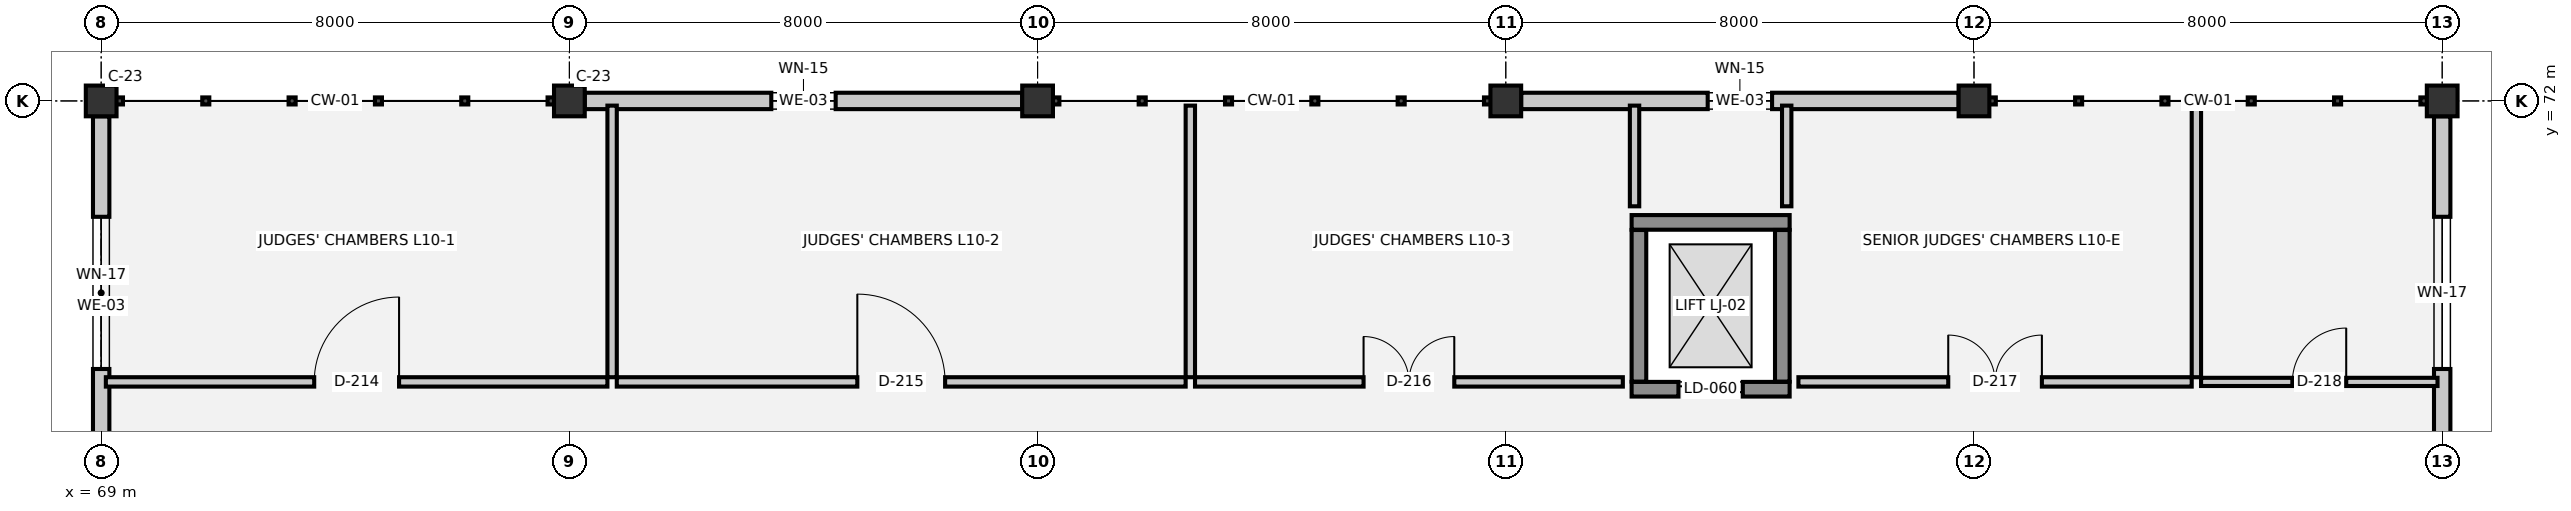
"""IFC4 building model, lengths in metres.
Left out: names, types, materials, properties, quantities, classifications, styles, units other than length and angle.
Written with IfcOpenShell. Run it as: python <this file> out.ifc"""

import sys

from ifc_helpers import new_model, si_unit, direction, frame, frame_2d, origin, origin_2d, place, context, subcontext, project, spatial, rectangle, extrude, element, fill, save


model = new_model("IFC4")
c1 = context("Model", 3, precision=1e-05, world=origin(), true_north=direction((0.0, 1.0)))
c2 = subcontext(c1, "Body", "Model", "MODEL_VIEW")
j1 = project(units=[si_unit("LENGTHUNIT", "METRE"), si_unit("PLANEANGLEUNIT", "RADIAN")], contexts=[c1])
p1 = place(None, origin())
s1 = spatial("IfcSite", under=j1, at=p1, CompositionType="ELEMENT")
p2 = place(p1, origin())
s2 = spatial("IfcBuilding", under=s1, at=p2, CompositionType="ELEMENT")
p3 = place(p2, frame((0.0, 0.0, 37.05)))
s3 = spatial("IfcBuildingStorey", under=s2, at=p3, CompositionType="ELEMENT", Elevation=37.05)
for number, where, z_axis, x_axis in (
    (1, (69.0, 72.0, 0.0), (0.0, 0.0, 1.0), (1.0, 0.0, 0.0)),
    (2, (77.0, 72.0, 0.0), (0.0, 0.0, 1.0), (1.0, 0.0, 0.0)),
    (3, (85.0, 72.0, 0.0), (0.0, 0.0, 1.0), (1.0, 0.0, 0.0)),
    (4, (93.0, 72.0, 0.0), (0.0, 0.0, 1.0), (1.0, 0.0, 0.0)),
    (5, (101.0, 72.0, 0.0), (0.0, 0.0, 1.0), (1.0, 0.0, 0.0)),
    (6, (109.0, 72.0, 0.0), (0.0, 0.0, 1.0), (1.0, 0.0, 0.0)),
):
    element("IfcColumn", number, at=place(p3, frame(where, z_axis=z_axis, x_axis=x_axis)), inside=s3, PredefinedType="COLUMN", context=c2, shape_type="SweptSolid", body=[
        extrude(rectangle(XDim=0.525, YDim=0.525, at=origin_2d()), origin(), (0.0, 0.0, 1.0), 3.75),
    ])
p4 = place(p3, frame((69.0, 65.262, 0.0), z_axis=(0.0, 0.0, 1.0), x_axis=(0.0, 1.0, 0.0)))
e7 = element("IfcWall", 7, at=p4, inside=s3, PredefinedType="SOLIDWALL", context=c2, shape_type="SweptSolid", body=[
    extrude(rectangle(XDim=6.475, YDim=0.28, at=frame_2d((3.238, 0.0))), origin(), (0.0, 0.0, 1.0), 2.6),
])
p5 = place(p4, frame((2.158, 0.0, 1.0)))
e8 = element("IfcOpeningElement", 8, at=p5, cuts=e7, PredefinedType="OPENING", context=c2, shape_type="SweptSolid", body=[
    extrude(rectangle(XDim=2.6, YDim=1.1, at=frame_2d((1.3, 0.55))), frame((0.0, 0.15, 0.0), z_axis=(0.0, -1.0, 0.0), x_axis=(1.0, 0.0, 0.0)), (0.0, 0.0, 1.0), 0.3),
])
p6 = place(p3, frame((77.262, 72.0, 0.0), z_axis=(0.0, 0.0, 1.0), x_axis=(1.0, 0.0, 0.0)))
e9 = element("IfcWall", 9, at=p6, inside=s3, PredefinedType="SOLIDWALL", context=c2, shape_type="SweptSolid", body=[
    extrude(rectangle(XDim=7.475, YDim=0.28, at=frame_2d((3.738, 0.0))), origin(), (0.0, 0.0, 1.0), 2.6),
])
p7 = place(p6, frame((3.188, 0.0, 0.9)))
e10 = element("IfcOpeningElement", 10, at=p7, cuts=e9, PredefinedType="OPENING", context=c2, shape_type="SweptSolid", body=[
    extrude(rectangle(XDim=1.1, YDim=1.2, at=frame_2d((0.55, 0.6))), frame((0.0, 0.15, 0.0), z_axis=(0.0, -1.0, 0.0), x_axis=(1.0, 0.0, 0.0)), (0.0, 0.0, 1.0), 0.3),
])
p8 = place(p3, frame((93.262, 72.0, 0.0), z_axis=(0.0, 0.0, 1.0), x_axis=(1.0, 0.0, 0.0)))
e11 = element("IfcWall", 11, at=p8, inside=s3, PredefinedType="SOLIDWALL", context=c2, shape_type="SweptSolid", body=[
    extrude(rectangle(XDim=7.475, YDim=0.28, at=frame_2d((3.738, 0.0))), origin(), (0.0, 0.0, 1.0), 2.6),
])
p9 = place(p8, frame((3.188, 0.0, 0.9)))
e12 = element("IfcOpeningElement", 12, at=p9, cuts=e11, PredefinedType="OPENING", context=c2, shape_type="SweptSolid", body=[
    extrude(rectangle(XDim=1.1, YDim=1.2, at=frame_2d((0.55, 0.6))), frame((0.0, 0.15, 0.0), z_axis=(0.0, -1.0, 0.0), x_axis=(1.0, 0.0, 0.0)), (0.0, 0.0, 1.0), 0.3),
])
p10 = place(p3, frame((109.0, 71.738, 0.0), z_axis=(0.0, 0.0, 1.0), x_axis=(0.0, -1.0, 0.0)))
e13 = element("IfcWall", 13, at=p10, inside=s3, PredefinedType="SOLIDWALL", context=c2, shape_type="SweptSolid", body=[
    extrude(rectangle(XDim=6.475, YDim=0.28, at=frame_2d((3.238, 0.0))), origin(), (0.0, 0.0, 1.0), 2.6),
])
p11 = place(p10, frame((1.717, 0.0, 1.0)))
e14 = element("IfcOpeningElement", 14, at=p11, cuts=e13, PredefinedType="OPENING", context=c2, shape_type="SweptSolid", body=[
    extrude(rectangle(XDim=2.6, YDim=1.1, at=frame_2d((1.3, 0.55))), frame((0.0, 0.15, 0.0), z_axis=(0.0, -1.0, 0.0), x_axis=(1.0, 0.0, 0.0)), (0.0, 0.0, 1.0), 0.3),
])
p12 = place(p3, frame((95.15, 67.075, 0.0), z_axis=(0.0, 0.0, 1.0), x_axis=(1.0, 0.0, 0.0)))
e15 = element("IfcWall", 15, at=p12, inside=s3, PredefinedType="SHEAR", context=c2, shape_type="SweptSolid", body=[
    extrude(rectangle(XDim=2.7, YDim=0.25, at=frame_2d((1.35, 0.0))), origin(), (0.0, 0.0, 1.0), 3.47),
])
p13 = place(p12, frame((0.8, 0.0, 0.0)))
e16 = element("IfcOpeningElement", 16, at=p13, cuts=e15, PredefinedType="OPENING", context=c2, shape_type="SweptSolid", body=[
    extrude(rectangle(XDim=1.1, YDim=2.15, at=frame_2d((0.55, 1.075))), frame((0.0, 0.135, 0.0), z_axis=(0.0, -1.0, 0.0), x_axis=(1.0, 0.0, 0.0)), (0.0, 0.0, 1.0), 0.27),
])
p14 = place(p3, frame((97.85, 69.925, 0.0), z_axis=(0.0, 0.0, 1.0), x_axis=(-1.0, 0.0, 0.0)))
e17 = element("IfcWall", 17, at=p14, inside=s3, PredefinedType="SHEAR", context=c2, shape_type="SweptSolid", body=[
    extrude(rectangle(XDim=2.7, YDim=0.25, at=frame_2d((1.35, 0.0))), origin(), (0.0, 0.0, 1.0), 3.47),
])
for number, where, z_axis, x_axis in (
    (18, (95.275, 69.795, 0.0), (0.0, 0.0, 1.0), (0.0, -1.0, 0.0)),
    (19, (97.725, 67.205, 0.0), (0.0, 0.0, 1.0), (0.0, 1.0, 0.0)),
):
    element("IfcWall", number, at=place(p3, frame(where, z_axis=z_axis, x_axis=x_axis)), inside=s3, PredefinedType="SHEAR", context=c2, shape_type="SweptSolid", body=[
        extrude(rectangle(XDim=2.59, YDim=0.25, at=frame_2d((1.295, 0.0))), origin(), (0.0, 0.0, 1.0), 3.47),
    ])
p15 = place(p3, frame((69.08, 67.2, 0.0), z_axis=(0.0, 0.0, 1.0), x_axis=(1.0, 0.0, 0.0)))
e20 = element("IfcWall", 20, at=p15, inside=s3, PredefinedType="PARTITIONING", context=c2, shape_type="SweptSolid", body=[
    extrude(rectangle(XDim=8.57, YDim=0.16, at=frame_2d((4.285, 0.0))), origin(), (0.0, 0.0, 1.0), 3.39),
])
p16 = place(p15, frame((3.56, 0.0, 0.0)))
e21 = element("IfcOpeningElement", 21, at=p16, cuts=e20, PredefinedType="OPENING", context=c2, shape_type="SweptSolid", body=[
    extrude(rectangle(XDim=1.45, YDim=2.25, at=frame_2d((0.725, 1.125))), frame((0.0, 0.09, 0.0), z_axis=(0.0, -1.0, 0.0), x_axis=(1.0, 0.0, 0.0)), (0.0, 0.0, 1.0), 0.18),
])
p17 = place(p3, frame((77.81, 67.2, 0.0), z_axis=(0.0, 0.0, 1.0), x_axis=(1.0, 0.0, 0.0)))
e22 = element("IfcWall", 22, at=p17, inside=s3, PredefinedType="PARTITIONING", context=c2, shape_type="SweptSolid", body=[
    extrude(rectangle(XDim=9.72, YDim=0.16, at=frame_2d((4.86, 0.0))), origin(), (0.0, 0.0, 1.0), 3.39),
])
p18 = place(p17, frame((4.11, 0.0, 0.0)))
e23 = element("IfcOpeningElement", 23, at=p18, cuts=e22, PredefinedType="OPENING", context=c2, shape_type="SweptSolid", body=[
    extrude(rectangle(XDim=1.5, YDim=2.25, at=frame_2d((0.75, 1.125))), frame((0.0, 0.09, 0.0), z_axis=(0.0, -1.0, 0.0), x_axis=(1.0, 0.0, 0.0)), (0.0, 0.0, 1.0), 0.18),
])
p19 = place(p3, frame((87.69, 67.2, 0.0), z_axis=(0.0, 0.0, 1.0), x_axis=(1.0, 0.0, 0.0)))
e24 = element("IfcWall", 24, at=p19, inside=s3, PredefinedType="PARTITIONING", context=c2, shape_type="SweptSolid", body=[
    extrude(rectangle(XDim=7.31, YDim=0.16, at=frame_2d((3.655, 0.0))), origin(), (0.0, 0.0, 1.0), 3.39),
])
p20 = place(p19, frame((2.88, 0.0, 0.0)))
e25 = element("IfcOpeningElement", 25, at=p20, cuts=e24, PredefinedType="OPENING", context=c2, shape_type="SweptSolid", body=[
    extrude(rectangle(XDim=1.55, YDim=2.25, at=frame_2d((0.775, 1.125))), frame((0.0, 0.09, 0.0), z_axis=(0.0, -1.0, 0.0), x_axis=(1.0, 0.0, 0.0)), (0.0, 0.0, 1.0), 0.18),
])
p21 = place(p3, frame((98.0, 67.2, 0.0), z_axis=(0.0, 0.0, 1.0), x_axis=(1.0, 0.0, 0.0)))
e26 = element("IfcWall", 26, at=p21, inside=s3, PredefinedType="PARTITIONING", context=c2, shape_type="SweptSolid", body=[
    extrude(rectangle(XDim=6.72, YDim=0.16, at=frame_2d((3.36, 0.0))), origin(), (0.0, 0.0, 1.0), 3.39),
])
p22 = place(p21, frame((2.56, 0.0, 0.0)))
e27 = element("IfcOpeningElement", 27, at=p22, cuts=e26, PredefinedType="OPENING", context=c2, shape_type="SweptSolid", body=[
    extrude(rectangle(XDim=1.6, YDim=2.25, at=frame_2d((0.8, 1.125))), frame((0.0, 0.09, 0.0), z_axis=(0.0, -1.0, 0.0), x_axis=(1.0, 0.0, 0.0)), (0.0, 0.0, 1.0), 0.18),
])
p23 = place(p3, frame((104.88, 67.2, 0.0), z_axis=(0.0, 0.0, 1.0), x_axis=(1.0, 0.0, 0.0)))
e28 = element("IfcWall", 28, at=p23, inside=s3, PredefinedType="PLUMBINGWALL", context=c2, shape_type="SweptSolid", body=[
    extrude(rectangle(XDim=4.04, YDim=0.14, at=frame_2d((2.02, 0.0))), origin(), (0.0, 0.0, 1.0), 3.39),
])
p24 = place(p23, frame((1.56, 0.0, 0.0)))
e29 = element("IfcOpeningElement", 29, at=p24, cuts=e28, PredefinedType="OPENING", context=c2, shape_type="SweptSolid", body=[
    extrude(rectangle(XDim=0.92, YDim=2.1, at=frame_2d((0.46, 1.05))), frame((0.0, 0.08, 0.0), z_axis=(0.0, -1.0, 0.0), x_axis=(1.0, 0.0, 0.0)), (0.0, 0.0, 1.0), 0.16),
])
for number, where, z_axis, x_axis in (
    (30, (77.73, 67.28, 0.0), (0.0, 0.0, 1.0), (0.0, 1.0, 0.0)),
    (31, (87.61, 67.28, 0.0), (0.0, 0.0, 1.0), (0.0, 1.0, 0.0)),
):
    element("IfcWall", number, at=place(p3, frame(where, z_axis=z_axis, x_axis=x_axis)), inside=s3, PredefinedType="PARTITIONING", context=c2, shape_type="SweptSolid", body=[
        extrude(rectangle(XDim=4.64, YDim=0.16, at=frame_2d((2.32, 0.0))), origin(), (0.0, 0.0, 1.0), 3.39),
    ])
for number, where, z_axis, x_axis in (
    (32, (95.2, 70.2, 0.0), (0.0, 0.0, 1.0), (0.0, 1.0, 0.0)),
    (33, (97.8, 70.2, 0.0), (0.0, 0.0, 1.0), (0.0, 1.0, 0.0)),
):
    element("IfcWall", number, at=place(p3, frame(where, z_axis=z_axis, x_axis=x_axis)), inside=s3, PredefinedType="PARTITIONING", context=c2, shape_type="SweptSolid", body=[
        extrude(rectangle(XDim=1.72, YDim=0.16, at=frame_2d((0.86, 0.0))), origin(), (0.0, 0.0, 1.0), 3.39),
    ])
p25 = place(p3, frame((104.8, 67.28, 0.0), z_axis=(0.0, 0.0, 1.0), x_axis=(0.0, 1.0, 0.0)))
e34 = element("IfcWall", 34, at=p25, inside=s3, PredefinedType="PARTITIONING", context=c2, shape_type="SweptSolid", body=[
    extrude(rectangle(XDim=4.64, YDim=0.16, at=frame_2d((2.32, 0.0))), origin(), (0.0, 0.0, 1.0), 3.39),
])
p26 = place(p5, origin())
e35 = element("IfcWindow", 35, at=p26, inside=s3, PartitioningType="SINGLE_PANEL", PredefinedType="WINDOW", context=c2, shape_type="SweptSolid", body=[
    extrude(rectangle(XDim=2.6, YDim=1.1, at=frame_2d((1.3, 0.55))), frame((0.0, 0.03, 0.0), z_axis=(0.0, -1.0, 0.0), x_axis=(1.0, 0.0, 0.0)), (0.0, 0.0, 1.0), 0.06),
])
fill(e8, e35)
p27 = place(p7, origin())
e36 = element("IfcWindow", 36, at=p27, inside=s3, PartitioningType="SINGLE_PANEL", PredefinedType="WINDOW", context=c2, shape_type="SweptSolid", body=[
    extrude(rectangle(XDim=1.1, YDim=1.2, at=frame_2d((0.55, 0.6))), frame((0.0, 0.03, 0.0), z_axis=(0.0, -1.0, 0.0), x_axis=(1.0, 0.0, 0.0)), (0.0, 0.0, 1.0), 0.06),
])
fill(e10, e36)
p28 = place(p9, origin())
e37 = element("IfcWindow", 37, at=p28, inside=s3, PartitioningType="SINGLE_PANEL", PredefinedType="WINDOW", context=c2, shape_type="SweptSolid", body=[
    extrude(rectangle(XDim=1.1, YDim=1.2, at=frame_2d((0.55, 0.6))), frame((0.0, 0.03, 0.0), z_axis=(0.0, -1.0, 0.0), x_axis=(1.0, 0.0, 0.0)), (0.0, 0.0, 1.0), 0.06),
])
fill(e12, e37)
p29 = place(p11, origin())
e38 = element("IfcWindow", 38, at=p29, inside=s3, PartitioningType="SINGLE_PANEL", PredefinedType="WINDOW", context=c2, shape_type="SweptSolid", body=[
    extrude(rectangle(XDim=2.6, YDim=1.1, at=frame_2d((1.3, 0.55))), frame((0.0, 0.03, 0.0), z_axis=(0.0, -1.0, 0.0), x_axis=(1.0, 0.0, 0.0)), (0.0, 0.0, 1.0), 0.06),
])
fill(e14, e38)
p30 = place(p13, origin())
e39 = element("IfcDoor", 39, at=p30, inside=s3, OperationType="DOUBLE_DOOR_SLIDING", PredefinedType="DOOR", context=c2, shape_type="SweptSolid", body=[
    extrude(rectangle(XDim=1.1, YDim=2.15, at=frame_2d((0.55, 1.075))), frame((0.0, 0.025, 0.0), z_axis=(0.0, -1.0, 0.0), x_axis=(1.0, 0.0, 0.0)), (0.0, 0.0, 1.0), 0.05),
])
fill(e16, e39)
p31 = place(p16, origin())
e40 = element("IfcDoor", 40, at=p31, inside=s3, OperationType="SINGLE_SWING_RIGHT", PredefinedType="DOOR", context=c2, shape_type="SweptSolid", body=[
    extrude(rectangle(XDim=1.45, YDim=2.25, at=frame_2d((0.725, 1.125))), frame((0.0, 0.025, 0.0), z_axis=(0.0, -1.0, 0.0), x_axis=(1.0, 0.0, 0.0)), (0.0, 0.0, 1.0), 0.05),
])
fill(e21, e40)
p32 = place(p18, origin())
e41 = element("IfcDoor", 41, at=p32, inside=s3, OperationType="SINGLE_SWING_LEFT", PredefinedType="DOOR", context=c2, shape_type="SweptSolid", body=[
    extrude(rectangle(XDim=1.5, YDim=2.25, at=frame_2d((0.75, 1.125))), frame((0.0, 0.025, 0.0), z_axis=(0.0, -1.0, 0.0), x_axis=(1.0, 0.0, 0.0)), (0.0, 0.0, 1.0), 0.05),
])
fill(e23, e41)
p33 = place(p20, origin())
e42 = element("IfcDoor", 42, at=p33, inside=s3, OperationType="DOUBLE_DOOR_SINGLE_SWING", PredefinedType="DOOR", context=c2, shape_type="SweptSolid", body=[
    extrude(rectangle(XDim=1.55, YDim=2.25, at=frame_2d((0.775, 1.125))), frame((0.0, 0.025, 0.0), z_axis=(0.0, -1.0, 0.0), x_axis=(1.0, 0.0, 0.0)), (0.0, 0.0, 1.0), 0.05),
])
fill(e25, e42)
p34 = place(p22, origin())
e43 = element("IfcDoor", 43, at=p34, inside=s3, OperationType="DOUBLE_DOOR_SINGLE_SWING", PredefinedType="DOOR", context=c2, shape_type="SweptSolid", body=[
    extrude(rectangle(XDim=1.6, YDim=2.25, at=frame_2d((0.8, 1.125))), frame((0.0, 0.025, 0.0), z_axis=(0.0, -1.0, 0.0), x_axis=(1.0, 0.0, 0.0)), (0.0, 0.0, 1.0), 0.05),
])
fill(e27, e43)
p35 = place(p24, origin())
e44 = element("IfcDoor", 44, at=p35, inside=s3, OperationType="SINGLE_SWING_RIGHT", PredefinedType="DOOR", context=c2, shape_type="SweptSolid", body=[
    extrude(rectangle(XDim=0.92, YDim=2.1, at=frame_2d((0.46, 1.05))), frame((0.0, 0.025, 0.0), z_axis=(0.0, -1.0, 0.0), x_axis=(1.0, 0.0, 0.0)), (0.0, 0.0, 1.0), 0.05),
])
fill(e29, e44)
save(model, sys.argv[1])
